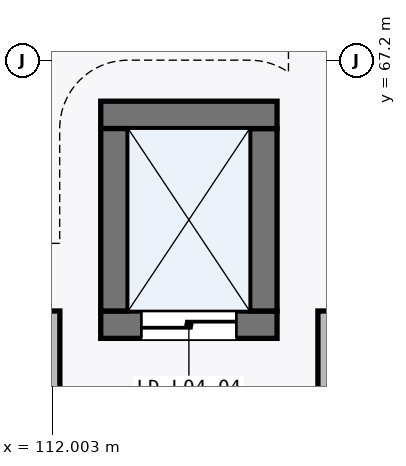
"""IFC4 building model, lengths in metres.
Left out: names, types, materials, properties, quantities, classifications, styles, units other than length and angle.
Written with IfcOpenShell. Run it as: python <this file> out.ifc"""

import sys

from ifc_helpers import new_model, si_unit, direction, frame, frame_2d, origin, place, context, subcontext, project, spatial, rectangle, extrude, element, fill, save


model = new_model("IFC4")
c1 = context("Model", 3, precision=1e-05, world=origin(), true_north=direction((0.0, 1.0)))
c2 = subcontext(c1, "Body", "Model", "MODEL_VIEW")
j1 = project(units=[si_unit("LENGTHUNIT", "METRE"), si_unit("PLANEANGLEUNIT", "RADIAN")], contexts=[c1])
p1 = place(None, origin())
s1 = spatial("IfcSite", under=j1, at=p1, CompositionType="ELEMENT")
p2 = place(p1, origin())
s2 = spatial("IfcBuilding", under=s1, at=p2, CompositionType="ELEMENT")
p3 = place(p2, frame((0.0, 0.0, 16.5)))
s3 = spatial("IfcBuildingStorey", under=s2, at=p3, CompositionType="ELEMENT", Elevation=16.5)
p4 = place(p3, frame((112.64, 63.72, 0.0), z_axis=(0.0, 0.0, 1.0), x_axis=(1.0, 0.0, 0.0)))
e1 = element("IfcWall", 1, at=p4, inside=s3, PredefinedType="SHEAR", context=c2, shape_type="SweptSolid", body=[
    extrude(rectangle(XDim=2.32, YDim=0.36, at=frame_2d((1.16, 0.0))), origin(), (0.0, 0.0, 1.0), 4.845),
])
p5 = place(p4, frame((0.535, 0.0, 0.0)))
e2 = element("IfcOpeningElement", 2, at=p5, cuts=e1, PredefinedType="OPENING", context=c2, shape_type="SweptSolid", body=[
    extrude(rectangle(XDim=1.25, YDim=2.2, at=frame_2d((0.625, 1.1))), frame((0.0, 0.19, 0.0), z_axis=(0.0, -1.0, 0.0), x_axis=(1.0, 0.0, 0.0)), (0.0, 0.0, 1.0), 0.38),
])
p6 = place(p3, frame((114.78, 63.9, 0.0), z_axis=(0.0, 0.0, 1.0), x_axis=(0.0, 1.0, 0.0)))
e3 = element("IfcWall", 3, at=p6, inside=s3, PredefinedType="SHEAR", context=c2, shape_type="SweptSolid", body=[
    extrude(rectangle(XDim=2.4, YDim=0.36, at=frame_2d((1.2, 0.0))), origin(), (0.0, 0.0, 1.0), 4.845),
])
p7 = place(p3, frame((114.96, 66.48, 0.0), z_axis=(0.0, 0.0, 1.0), x_axis=(-1.0, 0.0, 0.0)))
e4 = element("IfcWall", 4, at=p7, inside=s3, PredefinedType="SHEAR", context=c2, shape_type="SweptSolid", body=[
    extrude(rectangle(XDim=2.32, YDim=0.36, at=frame_2d((1.16, 0.0))), origin(), (0.0, 0.0, 1.0), 4.845),
])
p8 = place(p3, frame((112.82, 66.3, 0.0), z_axis=(0.0, 0.0, 1.0), x_axis=(0.0, -1.0, 0.0)))
e5 = element("IfcWall", 5, at=p8, inside=s3, PredefinedType="SHEAR", context=c2, shape_type="SweptSolid", body=[
    extrude(rectangle(XDim=2.4, YDim=0.36, at=frame_2d((1.2, 0.0))), origin(), (0.0, 0.0, 1.0), 4.845),
])
for number, where, z_axis, x_axis in (
    (6, (115.6, 59.397, 0.0), (0.0, 0.0, 1.0), (0.0, 1.0, 0.0)),
    (7, (112.0, 63.9, 0.0), (0.0, 0.0, 1.0), (0.0, -1.0, 0.0)),
):
    element("IfcWall", number, at=place(p3, frame(where, z_axis=z_axis, x_axis=x_axis)), inside=s3, PredefinedType="PARTITIONING", context=c2, shape_type="SweptSolid", body=[
        extrude(rectangle(XDim=4.502, YDim=0.205, at=frame_2d((2.251, 0.0))), origin(), (0.0, 0.0, 1.0), 4.845),
    ])
p9 = place(p5, frame((1.25, 0.0, 0.0), z_axis=(0.0, 0.0, 1.0), x_axis=(-1.0, 0.0, 0.0)))
e8 = element("IfcDoor", 8, at=p9, inside=s3, OperationType="DOUBLE_DOOR_SLIDING", PredefinedType="DOOR", context=c2, shape_type="SweptSolid", body=[
    extrude(rectangle(XDim=1.25, YDim=2.2, at=frame_2d((0.625, 1.1))), frame((0.0, 0.025, 0.0), z_axis=(0.0, -1.0, 0.0), x_axis=(1.0, 0.0, 0.0)), (0.0, 0.0, 1.0), 0.05),
])
fill(e2, e8)
save(model, sys.argv[1])
